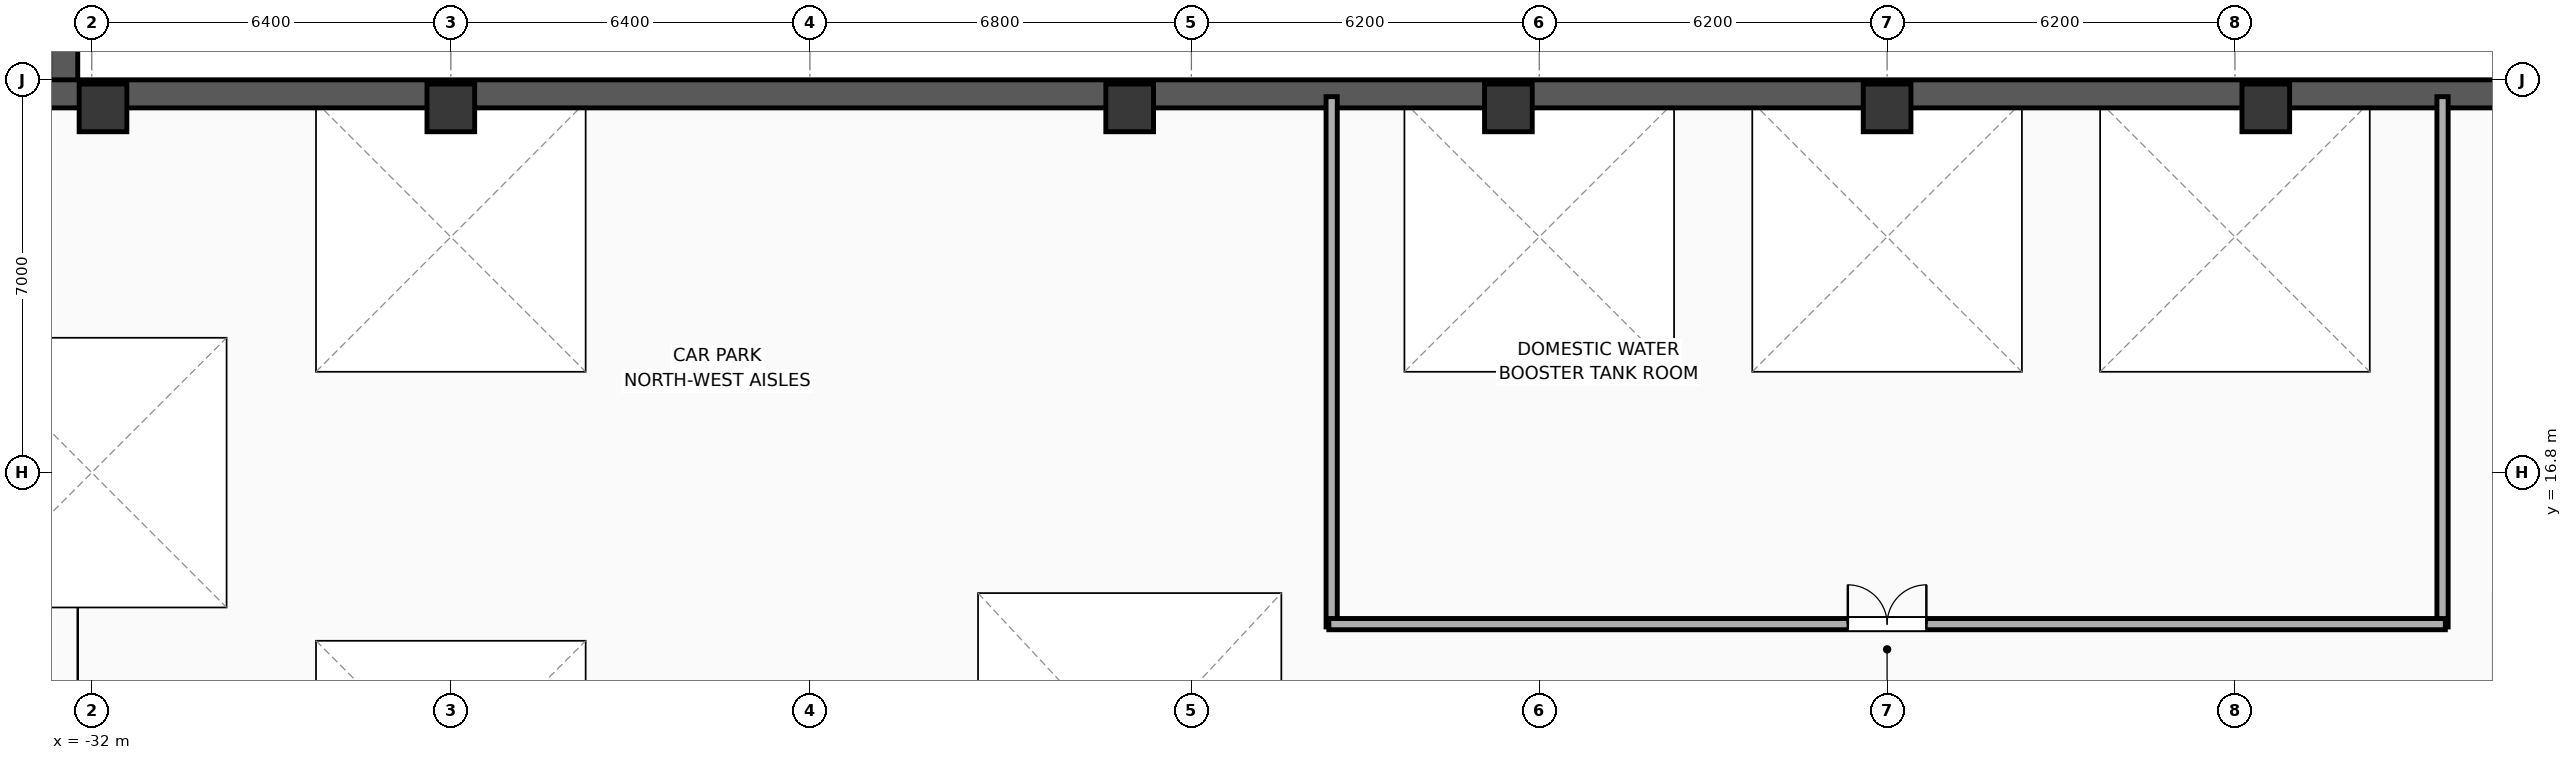
"""IFC4 building model, lengths in metres.
Left out: names, types, materials, properties, quantities, classifications, styles, units other than length and angle.
Written with IfcOpenShell. Run it as: python <this file> out.ifc"""

import sys

from ifc_helpers import new_model, si_unit, direction, frame, frame_2d, origin, origin_2d, place, context, subcontext, project, spatial, rectangle, extrude, element, fill, save


model = new_model("IFC4")
c1 = context("Model", 3, precision=1e-05, world=origin(), true_north=direction((0.0, 1.0)))
c2 = subcontext(c1, "Body", "Model", "MODEL_VIEW")
j1 = project(units=[si_unit("LENGTHUNIT", "METRE"), si_unit("PLANEANGLEUNIT", "RADIAN")], contexts=[c1])
p1 = place(None, origin())
s1 = spatial("IfcSite", under=j1, at=p1, CompositionType="ELEMENT")
p2 = place(p1, origin())
s2 = spatial("IfcBuilding", under=s1, at=p2, CompositionType="ELEMENT")
p3 = place(p2, frame((0.0, 0.0, -10.4)))
s3 = spatial("IfcBuildingStorey", under=s2, at=p3, CompositionType="ELEMENT", Elevation=-10.4)
p4 = place(p3, frame((-32.5, 23.55, 0.0), z_axis=(0.0, 0.0, 1.0), x_axis=(0.0, 1.0, 0.0)))
e1 = element("IfcWall", 1, at=p4, inside=s3, PredefinedType="USERDEFINED", context=c2, shape_type="SweptSolid", body=[
    extrude(rectangle(XDim=3.6, YDim=0.5, at=frame_2d((1.8, 0.0))), origin(), (0.0, 0.0, 1.0), 5.2),
])
p5 = place(p3, frame((-38.4, 23.55, 0.0), z_axis=(0.0, 0.0, 1.0), x_axis=(1.0, 0.0, 0.0)))
e2 = element("IfcWall", 2, at=p5, inside=s3, PredefinedType="USERDEFINED", context=c2, shape_type="SweptSolid", body=[
    extrude(rectangle(XDim=74.0, YDim=0.5, at=frame_2d((37.0, 0.0))), origin(), (0.0, 0.0, 1.0), 4.88),
])
for number, where, z_axis, x_axis in (
    (3, (-31.8, 23.3, 0.0), (0.0, 0.0, 1.0), (1.0, 0.0, 0.0)),
    (4, (-25.6, 23.3, 0.0), (0.0, 0.0, 1.0), (1.0, 0.0, 0.0)),
    (5, (-13.5, 23.3, 0.0), (0.0, 0.0, 1.0), (1.0, 0.0, 0.0)),
    (6, (-6.75, 23.3, 0.0), (0.0, 0.0, 1.0), (1.0, 0.0, 0.0)),
    (7, (0.0, 23.3, 0.0), (0.0, 0.0, 1.0), (1.0, 0.0, 0.0)),
    (8, (6.75, 23.3, 0.0), (0.0, 0.0, 1.0), (1.0, 0.0, 0.0)),
):
    element("IfcColumn", number, at=place(p3, frame(where, z_axis=z_axis, x_axis=x_axis)), inside=s3, PredefinedType="COLUMN", context=c2, shape_type="SweptSolid", body=[
        extrude(rectangle(XDim=0.85, YDim=0.85, at=origin_2d()), origin(), (0.0, 0.0, 1.0), 5.2),
    ])
for number, where, z_axis, x_axis in (
    (9, (-9.9, 14.05, 0.0), (0.0, 0.0, 1.0), (0.0, 1.0, 0.0)),
    (10, (9.9, 14.05, 0.0), (0.0, 0.0, 1.0), (0.0, 1.0, 0.0)),
):
    element("IfcWall", number, at=place(p3, frame(where, z_axis=z_axis, x_axis=x_axis)), inside=s3, PredefinedType="PARTITIONING", context=c2, shape_type="SweptSolid", body=[
        extrude(rectangle(XDim=9.45, YDim=0.2, at=frame_2d((4.725, 0.0))), origin(), (0.0, 0.0, 1.0), 4.88),
    ])
p6 = place(p3, frame((-9.95, 14.1, 0.0), z_axis=(0.0, 0.0, 1.0), x_axis=(1.0, 0.0, 0.0)))
e11 = element("IfcWall", 11, at=p6, inside=s3, PredefinedType="PARTITIONING", context=c2, shape_type="SweptSolid", body=[
    extrude(rectangle(XDim=19.9, YDim=0.2, at=frame_2d((9.95, 0.0))), origin(), (0.0, 0.0, 1.0), 4.88),
])
p7 = place(p6, frame((9.25, 0.0, 0.0)))
e12 = element("IfcOpeningElement", 12, at=p7, cuts=e11, PredefinedType="OPENING", context=c2, shape_type="SweptSolid", body=[
    extrude(rectangle(XDim=1.4, YDim=2.05, at=frame_2d((0.7, 1.025))), frame((0.0, 0.11, 0.0), z_axis=(0.0, -1.0, 0.0), x_axis=(1.0, 0.0, 0.0)), (0.0, 0.0, 1.0), 0.22),
])
p8 = place(p7, origin())
e13 = element("IfcDoor", 13, at=p8, inside=s3, OperationType="DOUBLE_DOOR_SINGLE_SWING", PredefinedType="DOOR", context=c2, shape_type="SweptSolid", body=[
    extrude(rectangle(XDim=1.4, YDim=2.05, at=frame_2d((0.7, 1.025))), frame((0.0, 0.025, 0.0), z_axis=(0.0, -1.0, 0.0), x_axis=(1.0, 0.0, 0.0)), (0.0, 0.0, 1.0), 0.05),
])
fill(e12, e13)
save(model, sys.argv[1])
